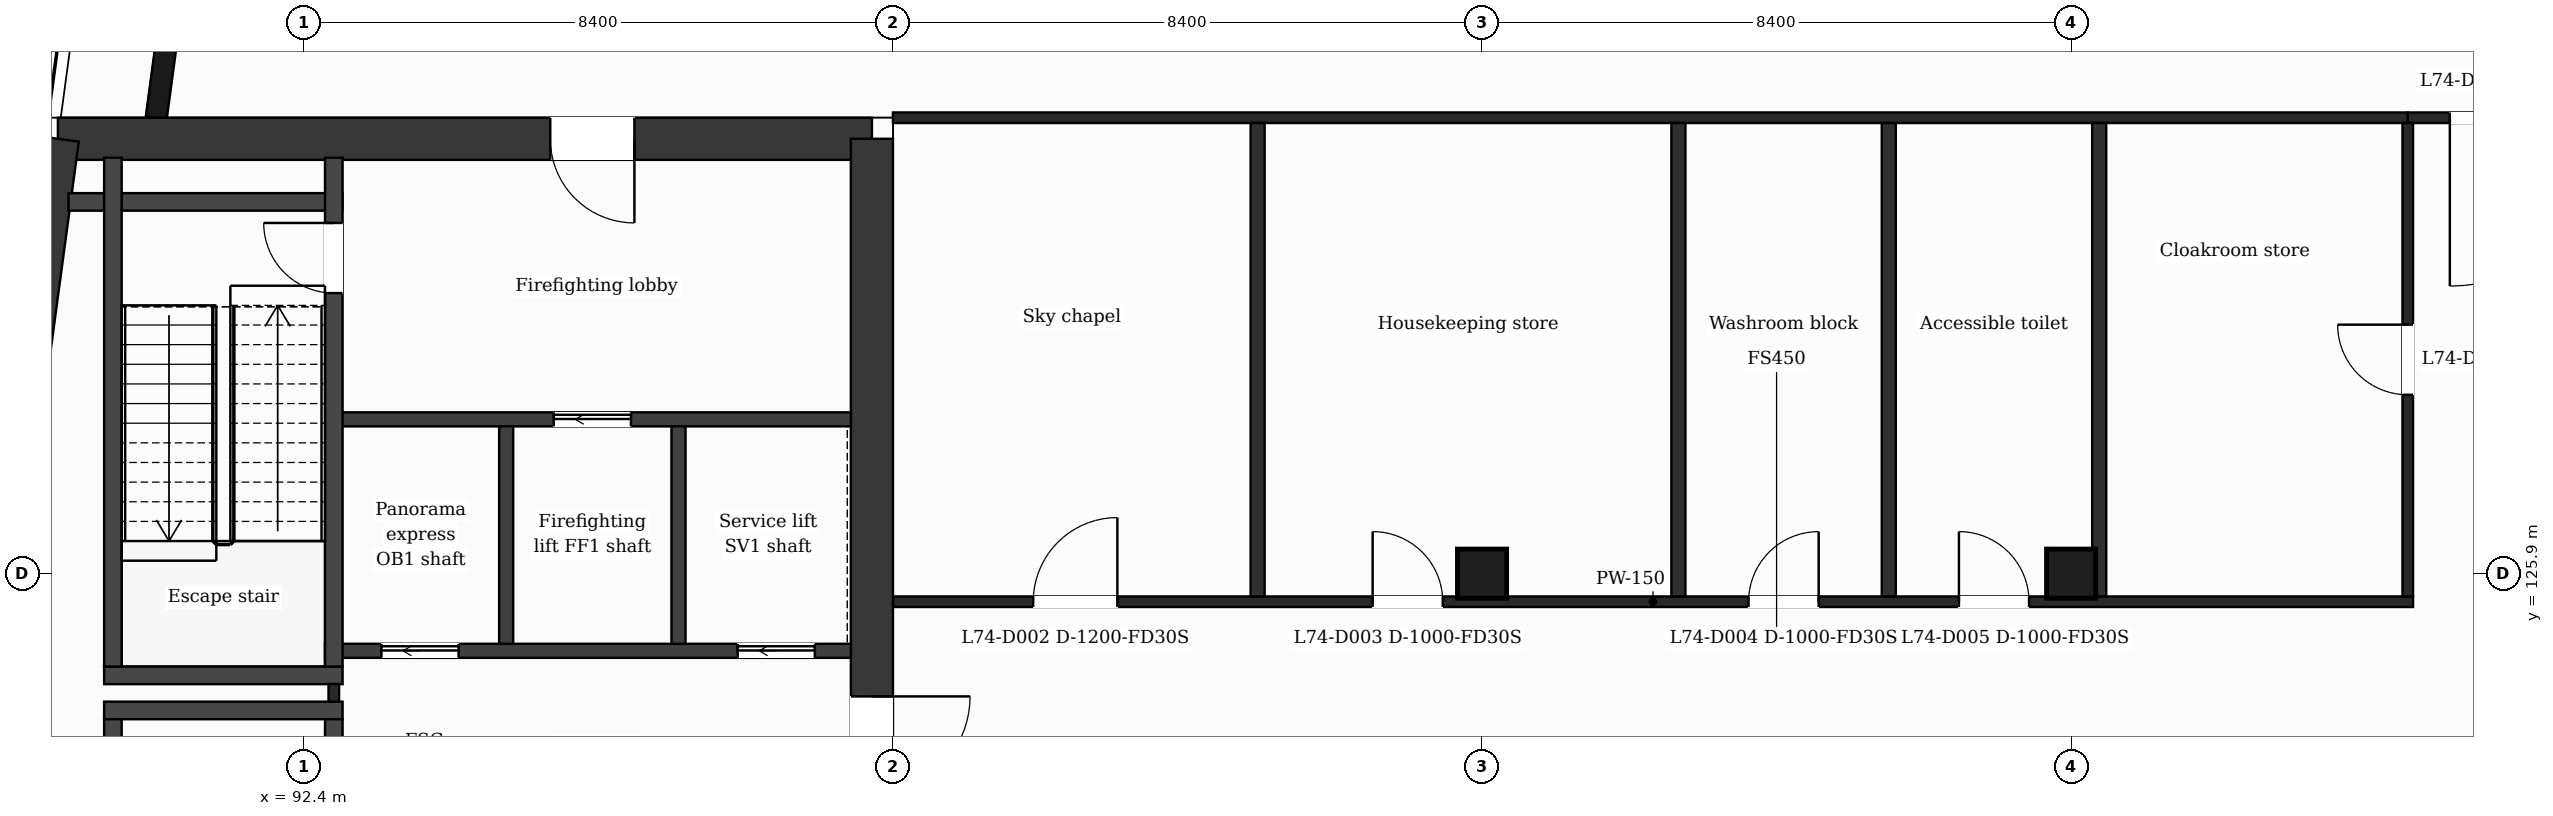
"""IFC4 building model, lengths in metres.
Left out: names, types, materials, properties, quantities, classifications, styles, units other than length and angle.
Written with IfcOpenShell. Run it as: python <this file> out.ifc"""

import sys

from ifc_helpers import new_model, si_unit, direction, frame, frame_2d, origin, origin_2d, place, context, subcontext, project, spatial, rectangle, extrude, element, fill, save


model = new_model("IFC4")
c1 = context("Model", 3, precision=1e-05, world=origin(), true_north=direction((0.0, 1.0)))
c2 = subcontext(c1, "Body", "Model", "MODEL_VIEW")
j1 = project(units=[si_unit("LENGTHUNIT", "METRE"), si_unit("PLANEANGLEUNIT", "RADIAN")], contexts=[c1])
p1 = place(None, origin())
s1 = spatial("IfcSite", under=j1, at=p1, CompositionType="ELEMENT")
p2 = place(p1, origin())
s2 = spatial("IfcBuilding", under=s1, at=p2, CompositionType="ELEMENT")
p3 = place(p2, frame((0.0, 0.0, 303.4)))
s3 = spatial("IfcBuildingStorey", under=s2, at=p3, CompositionType="ELEMENT", Elevation=303.4)
p4 = place(p3, frame((88.893, 132.1, 0.0), z_axis=(0.0, 0.0, 1.0), x_axis=(1.0, 0.0, 0.0)))
e1 = element("IfcWall", 1, at=p4, inside=s3, PredefinedType="SHEAR", context=c2, shape_type="SweptSolid", body=[
    extrude(rectangle(XDim=11.607, YDim=0.6, at=frame_2d((5.803, 0.0))), origin(), (0.0, 0.0, 1.0), 4.5),
])
p5 = place(p4, frame((7.021, 0.0, 0.0)))
e2 = element("IfcOpeningElement", 2, at=p5, cuts=e1, PredefinedType="OPENING", context=c2, shape_type="SweptSolid", body=[
    extrude(rectangle(XDim=1.2, YDim=2.1, at=frame_2d((0.6, 1.05))), frame((0.0, 0.31, 0.0), z_axis=(0.0, -1.0, 0.0), x_axis=(1.0, 0.0, 0.0)), (0.0, 0.0, 1.0), 0.62),
])
p6 = place(p3, frame((100.5, 132.1, 0.0), z_axis=(0.0, 0.0, 1.0), x_axis=(0.0, -1.0, 0.0)))
e3 = element("IfcWall", 3, at=p6, inside=s3, PredefinedType="SHEAR", context=c2, shape_type="SweptSolid", body=[
    extrude(rectangle(XDim=15.8, YDim=0.6, at=frame_2d((7.9, 0.0))), origin(), (0.0, 0.0, 1.0), 4.5),
])
p7 = place(p6, frame((7.95, 0.0, 0.0)))
e4 = element("IfcOpeningElement", 4, at=p7, cuts=e3, PredefinedType="OPENING", context=c2, shape_type="SweptSolid", body=[
    extrude(rectangle(XDim=1.4, YDim=2.1, at=frame_2d((0.7, 1.05))), frame((0.0, 0.31, 0.0), z_axis=(0.0, -1.0, 0.0), x_axis=(1.0, 0.0, 0.0)), (0.0, 0.0, 1.0), 0.62),
])
p8 = place(p3, frame((86.766, 116.3, 0.0), z_axis=(0.0, 0.0, 1.0), x_axis=(0.13341345841, 0.991060466932, 0.0)))
e5 = element("IfcWall", 5, at=p8, inside=s3, PredefinedType="SHEAR", context=c2, shape_type="SweptSolid", body=[
    extrude(rectangle(XDim=15.943, YDim=0.6, at=frame_2d((7.971, 0.0))), origin(), (0.0, 0.0, 1.0), 4.5),
])
for number, where, z_axis, x_axis in (
    (6, (109.2, 125.9, 0.0), (0.0, 0.0, 1.0), (1.0, 0.0, 0.0)),
    (7, (117.6, 125.9, 0.0), (0.0, 0.0, 1.0), (1.0, 0.0, 0.0)),
):
    element("IfcColumn", number, at=place(p3, frame(where, z_axis=z_axis, x_axis=x_axis)), inside=s3, PredefinedType="COLUMN", context=c2, shape_type="SweptSolid", body=[
        extrude(rectangle(XDim=0.7, YDim=0.7, at=origin_2d()), origin(), (0.0, 0.0, 1.0), 4.5),
    ])
p9 = place(p3, frame((91.177, 138.95, 0.0), z_axis=(0.0, 0.0, 1.0), x_axis=(-0.133426664613, -0.991058689065, 0.0)))
e8 = element("IfcWall", 8, at=p9, inside=s3, PredefinedType="SOLIDWALL", context=c2, shape_type="SweptSolid", body=[
    extrude(rectangle(XDim=6.609, YDim=0.3, at=frame_2d((3.305, 0.0))), origin(), (0.0, 0.0, 1.0), 4.05),
])
p10 = place(p9, frame((1.039, 0.0, 0.9)))
e9 = element("IfcOpeningElement", 9, at=p10, cuts=e8, PredefinedType="OPENING", context=c2, shape_type="SweptSolid", body=[
    extrude(rectangle(XDim=1.2, YDim=2.1, at=frame_2d((0.6, 1.05))), frame((0.0, 0.16, 0.0), z_axis=(0.0, -1.0, 0.0), x_axis=(1.0, 0.0, 0.0)), (0.0, 0.0, 1.0), 0.32),
])
p11 = place(p9, frame((4.294, 0.0, 0.0)))
e10 = element("IfcOpeningElement", 10, at=p11, cuts=e8, PredefinedType="OPENING", context=c2, shape_type="SweptSolid", body=[
    extrude(rectangle(XDim=1.2, YDim=2.4, at=frame_2d((0.6, 1.2))), frame((0.0, 0.16, 0.0), z_axis=(0.0, -1.0, 0.0), x_axis=(1.0, 0.0, 0.0)), (0.0, 0.0, 1.0), 0.32),
])
for number, where, z_axis, x_axis in (
    (11, (89.552, 123.95, 0.0), (0.0, 0.0, 1.0), (1.0, 0.0, 0.0)),
    (12, (89.552, 124.45, 0.0), (0.0, 0.0, 1.0), (1.0, 0.0, 0.0)),
):
    element("IfcWall", number, at=place(p3, frame(where, z_axis=z_axis, x_axis=x_axis)), inside=s3, PredefinedType="PARTITIONING", context=c2, shape_type="SweptSolid", body=[
        extrude(rectangle(XDim=3.4, YDim=0.25, at=frame_2d((1.7, 0.0))), origin(), (0.0, 0.0, 1.0), 4.05),
    ])
p12 = place(p3, frame((92.702, 124.8, 0.0), z_axis=(0.0, 0.0, 1.0), x_axis=(1.0, 0.0, 0.0)))
e13 = element("IfcWall", 13, at=p12, inside=s3, PredefinedType="PARTITIONING", context=c2, shape_type="SweptSolid", body=[
    extrude(rectangle(XDim=7.498, YDim=0.2, at=frame_2d((3.749, 0.0))), origin(), (0.0, 0.0, 1.0), 4.05),
])
p13 = place(p12, frame((0.804, 0.0, 0.0)))
e14 = element("IfcOpeningElement", 14, at=p13, cuts=e13, PredefinedType="OPENING", context=c2, shape_type="SweptSolid", body=[
    extrude(rectangle(XDim=1.1, YDim=2.1, at=frame_2d((0.55, 1.05))), frame((0.0, 0.11, 0.0), z_axis=(0.0, -1.0, 0.0), x_axis=(1.0, 0.0, 0.0)), (0.0, 0.0, 1.0), 0.22),
])
p14 = place(p12, frame((5.884, 0.0, 0.0)))
e15 = element("IfcOpeningElement", 15, at=p14, cuts=e13, PredefinedType="OPENING", context=c2, shape_type="SweptSolid", body=[
    extrude(rectangle(XDim=1.1, YDim=2.1, at=frame_2d((0.55, 1.05))), frame((0.0, 0.11, 0.0), z_axis=(0.0, -1.0, 0.0), x_axis=(1.0, 0.0, 0.0)), (0.0, 0.0, 1.0), 0.22),
])
p15 = place(p3, frame((100.8, 125.5, 0.0), z_axis=(0.0, 0.0, 1.0), x_axis=(1.0, 0.0, 0.0)))
e16 = element("IfcWall", 16, at=p15, inside=s3, PredefinedType="PARTITIONING", context=c2, shape_type="SweptSolid", body=[
    extrude(rectangle(XDim=21.675, YDim=0.15, at=frame_2d((10.837, 0.0))), origin(), (0.0, 0.0, 1.0), 4.05),
])
p16 = place(p15, frame((2.0, 0.0, 0.0)))
e17 = element("IfcOpeningElement", 17, at=p16, cuts=e16, PredefinedType="OPENING", context=c2, shape_type="SweptSolid", body=[
    extrude(rectangle(XDim=1.2, YDim=2.1, at=frame_2d((0.6, 1.05))), frame((0.0, 0.085, 0.0), z_axis=(0.0, -1.0, 0.0), x_axis=(1.0, 0.0, 0.0)), (0.0, 0.0, 1.0), 0.17),
])
p17 = place(p15, frame((6.84, 0.0, 0.0)))
e18 = element("IfcOpeningElement", 18, at=p17, cuts=e16, PredefinedType="OPENING", context=c2, shape_type="SweptSolid", body=[
    extrude(rectangle(XDim=1.0, YDim=2.1, at=frame_2d((0.5, 1.05))), frame((0.0, 0.085, 0.0), z_axis=(0.0, -1.0, 0.0), x_axis=(1.0, 0.0, 0.0)), (0.0, 0.0, 1.0), 0.17),
])
p18 = place(p15, frame((12.2, 0.0, 0.0)))
e19 = element("IfcOpeningElement", 19, at=p18, cuts=e16, PredefinedType="OPENING", context=c2, shape_type="SweptSolid", body=[
    extrude(rectangle(XDim=1.0, YDim=2.1, at=frame_2d((0.5, 1.05))), frame((0.0, 0.085, 0.0), z_axis=(0.0, -1.0, 0.0), x_axis=(1.0, 0.0, 0.0)), (0.0, 0.0, 1.0), 0.17),
])
p19 = place(p15, frame((15.2, 0.0, 0.0)))
e20 = element("IfcOpeningElement", 20, at=p19, cuts=e16, PredefinedType="OPENING", context=c2, shape_type="SweptSolid", body=[
    extrude(rectangle(XDim=1.0, YDim=2.1, at=frame_2d((0.5, 1.05))), frame((0.0, 0.085, 0.0), z_axis=(0.0, -1.0, 0.0), x_axis=(1.0, 0.0, 0.0)), (0.0, 0.0, 1.0), 0.17),
])
p20 = place(p3, frame((92.827, 128.1, 0.0), z_axis=(0.0, 0.0, 1.0), x_axis=(1.0, 0.0, 0.0)))
e21 = element("IfcWall", 21, at=p20, inside=s3, PredefinedType="PARTITIONING", context=c2, shape_type="SweptSolid", body=[
    extrude(rectangle(XDim=7.373, YDim=0.2, at=frame_2d((3.687, 0.0))), origin(), (0.0, 0.0, 1.0), 4.05),
])
p21 = place(p20, frame((3.137, 0.0, 0.0)))
e22 = element("IfcOpeningElement", 22, at=p21, cuts=e21, PredefinedType="OPENING", context=c2, shape_type="SweptSolid", body=[
    extrude(rectangle(XDim=1.1, YDim=2.1, at=frame_2d((0.55, 1.05))), frame((0.0, 0.11, 0.0), z_axis=(0.0, -1.0, 0.0), x_axis=(1.0, 0.0, 0.0)), (0.0, 0.0, 1.0), 0.22),
])
p22 = place(p3, frame((89.045, 131.2, 0.0), z_axis=(0.0, 0.0, 1.0), x_axis=(1.0, 0.0, 0.0)))
e23 = element("IfcWall", 23, at=p22, inside=s3, PredefinedType="PARTITIONING", context=c2, shape_type="SweptSolid", body=[
    extrude(rectangle(XDim=3.907, YDim=0.25, at=frame_2d((1.954, 0.0))), origin(), (0.0, 0.0, 1.0), 4.05),
])
p23 = place(p3, frame((122.4, 132.4, 0.0), z_axis=(0.0, 0.0, 1.0), x_axis=(1.0, 0.0, 0.0)))
e24 = element("IfcWall", 24, at=p23, inside=s3, PredefinedType="PARTITIONING", context=c2, shape_type="SweptSolid", body=[
    extrude(rectangle(XDim=3.6, YDim=0.15, at=frame_2d((1.8, 0.0))), origin(), (0.0, 0.0, 1.0), 4.05),
])
p24 = place(p23, frame((0.6, 0.0, 0.0)))
e25 = element("IfcOpeningElement", 25, at=p24, cuts=e24, PredefinedType="OPENING", context=c2, shape_type="SweptSolid", body=[
    extrude(rectangle(XDim=2.4, YDim=2.1, at=frame_2d((1.2, 1.05))), frame((0.0, 0.085, 0.0), z_axis=(0.0, -1.0, 0.0), x_axis=(1.0, 0.0, 0.0)), (0.0, 0.0, 1.0), 0.17),
])
p25 = place(p3, frame((100.8, 132.4, 0.0), z_axis=(0.0, 0.0, 1.0), x_axis=(1.0, 0.0, 0.0)))
e26 = element("IfcWall", 26, at=p25, inside=s3, PredefinedType="PARTITIONING", context=c2, shape_type="SweptSolid", body=[
    extrude(rectangle(XDim=21.6, YDim=0.15, at=frame_2d((10.8, 0.0))), origin(), (0.0, 0.0, 1.0), 4.05),
])
p26 = place(p3, frame((89.677, 116.57, 0.0), z_axis=(0.0, 0.0, 1.0), x_axis=(0.0, 1.0, 0.0)))
e27 = element("IfcWall", 27, at=p26, inside=s3, PredefinedType="PARTITIONING", context=c2, shape_type="SweptSolid", body=[
    extrude(rectangle(XDim=7.255, YDim=0.25, at=frame_2d((3.627, 0.0))), origin(), (0.0, 0.0, 1.0), 4.05),
])
p27 = place(p3, frame((89.677, 124.575, 0.0), z_axis=(0.0, 0.0, 1.0), x_axis=(0.0, 1.0, 0.0)))
e28 = element("IfcWall", 28, at=p27, inside=s3, PredefinedType="PARTITIONING", context=c2, shape_type="SweptSolid", body=[
    extrude(rectangle(XDim=7.255, YDim=0.25, at=frame_2d((3.627, 0.0))), origin(), (0.0, 0.0, 1.0), 4.05),
])
p28 = place(p3, frame((92.827, 124.075, 0.0), z_axis=(0.0, 0.0, 1.0), x_axis=(0.0, 1.0, 0.0)))
e29 = element("IfcWall", 29, at=p28, inside=s3, PredefinedType="PARTITIONING", context=c2, shape_type="SweptSolid", body=[
    extrude(rectangle(XDim=0.25, YDim=0.15, at=frame_2d((0.125, 0.0))), origin(), (0.0, 0.0, 1.0), 4.05),
])
p29 = place(p3, frame((92.827, 116.57, 0.0), z_axis=(0.0, 0.0, 1.0), x_axis=(0.0, 1.0, 0.0)))
e30 = element("IfcWall", 30, at=p29, inside=s3, PredefinedType="PARTITIONING", context=c2, shape_type="SweptSolid", body=[
    extrude(rectangle(XDim=7.255, YDim=0.25, at=frame_2d((3.627, 0.0))), origin(), (0.0, 0.0, 1.0), 4.05),
])
p30 = place(p29, frame((5.955, 0.0, 0.0)))
e31 = element("IfcOpeningElement", 31, at=p30, cuts=e30, PredefinedType="OPENING", context=c2, shape_type="SweptSolid", body=[
    extrude(rectangle(XDim=0.95, YDim=2.1, at=frame_2d((0.475, 1.05))), frame((0.0, 0.135, 0.0), z_axis=(0.0, -1.0, 0.0), x_axis=(1.0, 0.0, 0.0)), (0.0, 0.0, 1.0), 0.27),
])
p31 = place(p3, frame((92.827, 124.575, 0.0), z_axis=(0.0, 0.0, 1.0), x_axis=(0.0, 1.0, 0.0)))
e32 = element("IfcWall", 32, at=p31, inside=s3, PredefinedType="PARTITIONING", context=c2, shape_type="SweptSolid", body=[
    extrude(rectangle(XDim=7.255, YDim=0.25, at=frame_2d((3.627, 0.0))), origin(), (0.0, 0.0, 1.0), 4.05),
])
p32 = place(p31, frame((5.325, 0.0, 0.0)))
e33 = element("IfcOpeningElement", 33, at=p32, cuts=e32, PredefinedType="OPENING", context=c2, shape_type="SweptSolid", body=[
    extrude(rectangle(XDim=1.0, YDim=2.1, at=frame_2d((0.5, 1.05))), frame((0.0, 0.135, 0.0), z_axis=(0.0, -1.0, 0.0), x_axis=(1.0, 0.0, 0.0)), (0.0, 0.0, 1.0), 0.27),
])
for number, where, z_axis, x_axis in (
    (34, (95.285, 124.9, 0.0), (0.0, 0.0, 1.0), (0.0, 1.0, 0.0)),
    (35, (97.742, 124.9, 0.0), (0.0, 0.0, 1.0), (0.0, 1.0, 0.0)),
):
    element("IfcWall", number, at=place(p3, frame(where, z_axis=z_axis, x_axis=x_axis)), inside=s3, PredefinedType="PARTITIONING", context=c2, shape_type="SweptSolid", body=[
        extrude(rectangle(XDim=3.1, YDim=0.2, at=frame_2d((1.55, 0.0))), origin(), (0.0, 0.0, 1.0), 4.05),
    ])
for number, where, z_axis, x_axis in (
    (36, (106.0, 125.575, 0.0), (0.0, 0.0, 1.0), (0.0, 1.0, 0.0)),
    (37, (112.0, 125.575, 0.0), (0.0, 0.0, 1.0), (0.0, 1.0, 0.0)),
    (38, (115.0, 125.575, 0.0), (0.0, 0.0, 1.0), (0.0, 1.0, 0.0)),
    (39, (118.0, 125.575, 0.0), (0.0, 0.0, 1.0), (0.0, 1.0, 0.0)),
):
    element("IfcWall", number, at=place(p3, frame(where, z_axis=z_axis, x_axis=x_axis)), inside=s3, PredefinedType="PARTITIONING", context=c2, shape_type="SweptSolid", body=[
        extrude(rectangle(XDim=6.75, YDim=0.2, at=frame_2d((3.375, 0.0))), origin(), (0.0, 0.0, 1.0), 4.05),
    ])
p33 = place(p3, frame((122.4, 125.575, 0.0), z_axis=(0.0, 0.0, 1.0), x_axis=(0.0, 1.0, 0.0)))
e40 = element("IfcWall", 40, at=p33, inside=s3, PredefinedType="PARTITIONING", context=c2, shape_type="SweptSolid", body=[
    extrude(rectangle(XDim=6.75, YDim=0.15, at=frame_2d((3.375, 0.0))), origin(), (0.0, 0.0, 1.0), 4.05),
])
p34 = place(p33, frame((2.875, 0.0, 0.0)))
e41 = element("IfcOpeningElement", 41, at=p34, cuts=e40, PredefinedType="OPENING", context=c2, shape_type="SweptSolid", body=[
    extrude(rectangle(XDim=1.0, YDim=2.1, at=frame_2d((0.5, 1.05))), frame((0.0, 0.085, 0.0), z_axis=(0.0, -1.0, 0.0), x_axis=(1.0, 0.0, 0.0)), (0.0, 0.0, 1.0), 0.17),
])
p35 = place(p24, origin())
e42 = element("IfcDoor", 42, at=p35, inside=s3, OperationType="SINGLE_SWING_LEFT", PredefinedType="DOOR", context=c2, shape_type="SweptSolid", body=[
    extrude(rectangle(XDim=2.4, YDim=2.1, at=frame_2d((1.2, 1.05))), frame((0.0, 0.025, 0.0), z_axis=(0.0, -1.0, 0.0), x_axis=(1.0, 0.0, 0.0)), (0.0, 0.0, 1.0), 0.05),
])
fill(e25, e42)
p36 = place(p16, origin())
e43 = element("IfcDoor", 43, at=p36, inside=s3, OperationType="SINGLE_SWING_RIGHT", PredefinedType="DOOR", context=c2, shape_type="SweptSolid", body=[
    extrude(rectangle(XDim=1.2, YDim=2.1, at=frame_2d((0.6, 1.05))), frame((0.0, 0.025, 0.0), z_axis=(0.0, -1.0, 0.0), x_axis=(1.0, 0.0, 0.0)), (0.0, 0.0, 1.0), 0.05),
])
fill(e17, e43)
p37 = place(p17, origin())
e44 = element("IfcDoor", 44, at=p37, inside=s3, OperationType="SINGLE_SWING_LEFT", PredefinedType="DOOR", context=c2, shape_type="SweptSolid", body=[
    extrude(rectangle(XDim=1.0, YDim=2.1, at=frame_2d((0.5, 1.05))), frame((0.0, 0.025, 0.0), z_axis=(0.0, -1.0, 0.0), x_axis=(1.0, 0.0, 0.0)), (0.0, 0.0, 1.0), 0.05),
])
fill(e18, e44)
p38 = place(p18, origin())
e45 = element("IfcDoor", 45, at=p38, inside=s3, OperationType="SINGLE_SWING_RIGHT", PredefinedType="DOOR", context=c2, shape_type="SweptSolid", body=[
    extrude(rectangle(XDim=1.0, YDim=2.1, at=frame_2d((0.5, 1.05))), frame((0.0, 0.025, 0.0), z_axis=(0.0, -1.0, 0.0), x_axis=(1.0, 0.0, 0.0)), (0.0, 0.0, 1.0), 0.05),
])
fill(e19, e45)
p39 = place(p19, origin())
e46 = element("IfcDoor", 46, at=p39, inside=s3, OperationType="SINGLE_SWING_LEFT", PredefinedType="DOOR", context=c2, shape_type="SweptSolid", body=[
    extrude(rectangle(XDim=1.0, YDim=2.1, at=frame_2d((0.5, 1.05))), frame((0.0, 0.025, 0.0), z_axis=(0.0, -1.0, 0.0), x_axis=(1.0, 0.0, 0.0)), (0.0, 0.0, 1.0), 0.05),
])
fill(e20, e46)
p40 = place(p34, origin())
e47 = element("IfcDoor", 47, at=p40, inside=s3, OperationType="SINGLE_SWING_RIGHT", PredefinedType="DOOR", context=c2, shape_type="SweptSolid", body=[
    extrude(rectangle(XDim=1.0, YDim=2.1, at=frame_2d((0.5, 1.05))), frame((0.0, 0.025, 0.0), z_axis=(0.0, -1.0, 0.0), x_axis=(1.0, 0.0, 0.0)), (0.0, 0.0, 1.0), 0.05),
])
fill(e41, e47)
p41 = place(p13, origin())
e48 = element("IfcDoor", 48, at=p41, inside=s3, OperationType="SLIDING_TO_LEFT", PredefinedType="DOOR", context=c2, shape_type="SweptSolid", body=[
    extrude(rectangle(XDim=1.1, YDim=2.1, at=frame_2d((0.55, 1.05))), frame((0.0, 0.025, 0.0), z_axis=(0.0, -1.0, 0.0), x_axis=(1.0, 0.0, 0.0)), (0.0, 0.0, 1.0), 0.05),
])
fill(e14, e48)
p42 = place(p21, origin())
e49 = element("IfcDoor", 49, at=p42, inside=s3, OperationType="SLIDING_TO_LEFT", PredefinedType="DOOR", context=c2, shape_type="SweptSolid", body=[
    extrude(rectangle(XDim=1.1, YDim=2.1, at=frame_2d((0.55, 1.05))), frame((0.0, 0.025, 0.0), z_axis=(0.0, -1.0, 0.0), x_axis=(1.0, 0.0, 0.0)), (0.0, 0.0, 1.0), 0.05),
])
fill(e22, e49)
p43 = place(p14, origin())
e50 = element("IfcDoor", 50, at=p43, inside=s3, OperationType="SLIDING_TO_LEFT", PredefinedType="DOOR", context=c2, shape_type="SweptSolid", body=[
    extrude(rectangle(XDim=1.1, YDim=2.1, at=frame_2d((0.55, 1.05))), frame((0.0, 0.025, 0.0), z_axis=(0.0, -1.0, 0.0), x_axis=(1.0, 0.0, 0.0)), (0.0, 0.0, 1.0), 0.05),
])
fill(e15, e50)
p44 = place(p32, origin())
e51 = element("IfcDoor", 51, at=p44, inside=s3, OperationType="SINGLE_SWING_RIGHT", PredefinedType="DOOR", context=c2, shape_type="SweptSolid", body=[
    extrude(rectangle(XDim=1.0, YDim=2.1, at=frame_2d((0.5, 1.05))), frame((0.0, 0.025, 0.0), z_axis=(0.0, -1.0, 0.0), x_axis=(1.0, 0.0, 0.0)), (0.0, 0.0, 1.0), 0.05),
])
fill(e33, e51)
p45 = place(p5, origin())
e52 = element("IfcDoor", 52, at=p45, inside=s3, OperationType="SINGLE_SWING_RIGHT", PredefinedType="DOOR", context=c2, shape_type="SweptSolid", body=[
    extrude(rectangle(XDim=1.2, YDim=2.1, at=frame_2d((0.6, 1.05))), frame((0.0, 0.025, 0.0), z_axis=(0.0, -1.0, 0.0), x_axis=(1.0, 0.0, 0.0)), (0.0, 0.0, 1.0), 0.05),
])
fill(e2, e52)
p46 = place(p7, origin())
e53 = element("IfcDoor", 53, at=p46, inside=s3, OperationType="SINGLE_SWING_LEFT", PredefinedType="DOOR", context=c2, shape_type="SweptSolid", body=[
    extrude(rectangle(XDim=1.4, YDim=2.1, at=frame_2d((0.7, 1.05))), frame((0.0, 0.025, 0.0), z_axis=(0.0, -1.0, 0.0), x_axis=(1.0, 0.0, 0.0)), (0.0, 0.0, 1.0), 0.05),
])
fill(e4, e53)
save(model, sys.argv[1])
